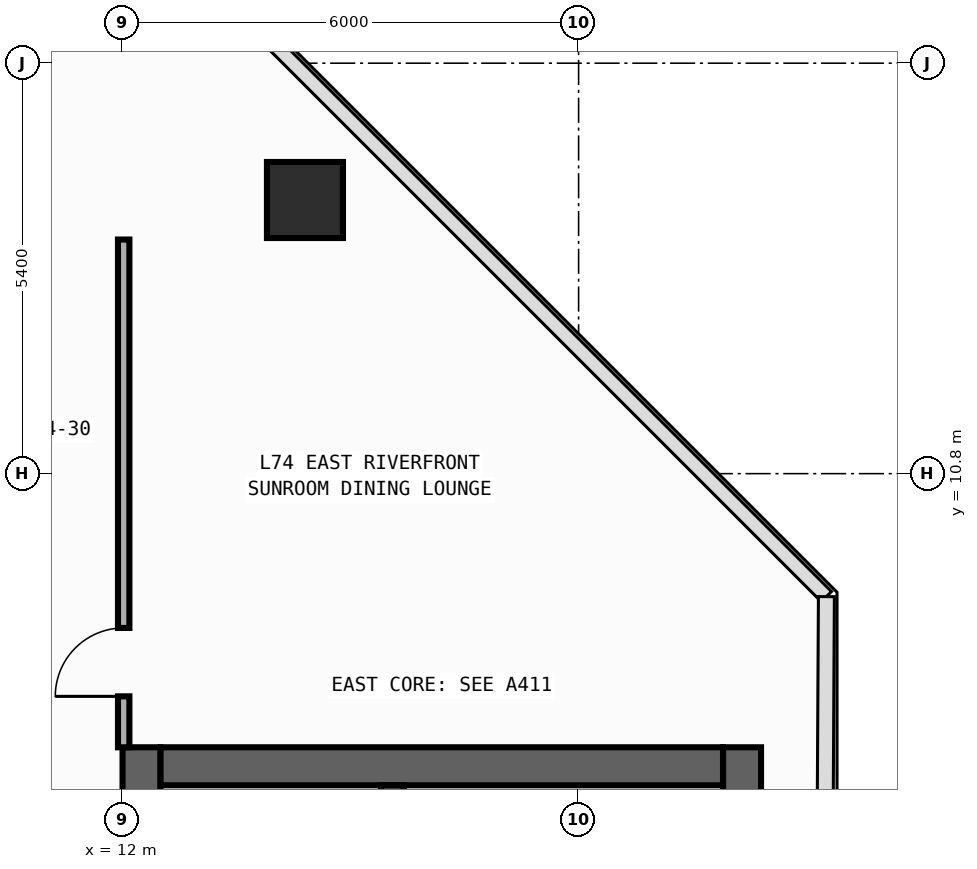
"""IFC4 building model, lengths in metres.
Left out: names, types, materials, properties, quantities, classifications, styles, units other than length and angle.
Written with IfcOpenShell. Run it as: python <this file> out.ifc"""

import sys

from ifc_helpers import new_model, si_unit, direction, frame, frame_2d, origin, origin_2d, place, context, subcontext, project, spatial, rectangle, circle, extrude, element, fill, save


model = new_model("IFC4")
c1 = context("Model", 3, precision=1e-05, world=origin(), true_north=direction((0.0, 1.0)))
c2 = subcontext(c1, "Body", "Model", "MODEL_VIEW")
j1 = project(units=[si_unit("LENGTHUNIT", "METRE"), si_unit("PLANEANGLEUNIT", "RADIAN")], contexts=[c1])
p1 = place(None, origin())
s1 = spatial("IfcSite", under=j1, at=p1, CompositionType="ELEMENT")
p2 = place(p1, origin())
s2 = spatial("IfcBuilding", under=s1, at=p2, CompositionType="ELEMENT")
p3 = place(p2, frame((0.0, 0.0, 308.0)))
s3 = spatial("IfcBuildingStorey", under=s2, at=p3, CompositionType="ELEMENT", Elevation=308.0)
p4 = place(p3, frame((12.25, -19.8, 0.0), z_axis=(0.0, 0.0, 1.0), x_axis=(0.0, 1.0, 0.0)))
e1 = element("IfcWall", 1, at=p4, inside=s3, PredefinedType="SHEAR", context=c2, shape_type="SweptSolid", body=[
    extrude(rectangle(XDim=27.0, YDim=0.5, at=frame_2d((13.5, 0.0))), origin(), (0.0, 0.0, 1.0), 3.54),
])
p5 = place(p4, frame((23.05, 0.0, 0.0)))
e2 = element("IfcOpeningElement", 2, at=p5, cuts=e1, PredefinedType="OPENING", context=c2, shape_type="SweptSolid", body=[
    extrude(rectangle(XDim=1.1, YDim=2.2, at=frame_2d((0.55, 1.1))), frame((0.0, 0.26, 0.0), z_axis=(0.0, -1.0, 0.0), x_axis=(1.0, 0.0, 0.0)), (0.0, 0.0, 1.0), 0.52),
])
p6 = place(p4, frame((19.85, 0.0, 0.0)))
e3 = element("IfcOpeningElement", 3, at=p6, cuts=e1, PredefinedType="OPENING", context=c2, shape_type="SweptSolid", body=[
    extrude(rectangle(XDim=1.1, YDim=2.2, at=frame_2d((0.55, 1.1))), frame((0.0, 0.26, 0.0), z_axis=(0.0, -1.0, 0.0), x_axis=(1.0, 0.0, 0.0)), (0.0, 0.0, 1.0), 0.52),
])
p7 = place(p4, frame((16.65, 0.0, 0.0)))
e4 = element("IfcOpeningElement", 4, at=p7, cuts=e1, PredefinedType="OPENING", context=c2, shape_type="SweptSolid", body=[
    extrude(rectangle(XDim=1.1, YDim=2.2, at=frame_2d((0.55, 1.1))), frame((0.0, 0.26, 0.0), z_axis=(0.0, -1.0, 0.0), x_axis=(1.0, 0.0, 0.0)), (0.0, 0.0, 1.0), 0.52),
])
p8 = place(p4, frame((6.275, 0.0, 0.0)))
e5 = element("IfcOpeningElement", 5, at=p8, cuts=e1, PredefinedType="OPENING", context=c2, shape_type="SweptSolid", body=[
    extrude(rectangle(XDim=0.85, YDim=2.1, at=frame_2d((0.425, 1.05))), frame((0.0, 0.26, 0.0), z_axis=(0.0, -1.0, 0.0), x_axis=(1.0, 0.0, 0.0)), (0.0, 0.0, 1.0), 0.52),
])
p9 = place(p4, frame((8.575, 0.0, 0.0)))
e6 = element("IfcOpeningElement", 6, at=p9, cuts=e1, PredefinedType="OPENING", context=c2, shape_type="SweptSolid", body=[
    extrude(rectangle(XDim=0.85, YDim=2.1, at=frame_2d((0.425, 1.05))), frame((0.0, 0.26, 0.0), z_axis=(0.0, -1.0, 0.0), x_axis=(1.0, 0.0, 0.0)), (0.0, 0.0, 1.0), 0.52),
])
p10 = place(p4, frame((10.675, 0.0, 0.0)))
e7 = element("IfcOpeningElement", 7, at=p10, cuts=e1, PredefinedType="OPENING", context=c2, shape_type="SweptSolid", body=[
    extrude(rectangle(XDim=0.85, YDim=2.1, at=frame_2d((0.425, 1.05))), frame((0.0, 0.26, 0.0), z_axis=(0.0, -1.0, 0.0), x_axis=(1.0, 0.0, 0.0)), (0.0, 0.0, 1.0), 0.52),
])
p11 = place(p4, frame((12.725, 0.0, 0.0)))
e8 = element("IfcOpeningElement", 8, at=p11, cuts=e1, PredefinedType="OPENING", context=c2, shape_type="SweptSolid", body=[
    extrude(rectangle(XDim=1.15, YDim=2.2, at=frame_2d((0.575, 1.1))), frame((0.0, 0.26, 0.0), z_axis=(0.0, -1.0, 0.0), x_axis=(1.0, 0.0, 0.0)), (0.0, 0.0, 1.0), 0.52),
])
p12 = place(p4, frame((25.125, 0.0, 0.0)))
e9 = element("IfcOpeningElement", 9, at=p12, cuts=e1, PredefinedType="OPENING", context=c2, shape_type="SweptSolid", body=[
    extrude(rectangle(XDim=0.85, YDim=2.1, at=frame_2d((0.425, 1.05))), frame((0.0, 0.26, 0.0), z_axis=(0.0, -1.0, 0.0), x_axis=(1.0, 0.0, 0.0)), (0.0, 0.0, 1.0), 0.52),
])
p13 = place(p3, frame((20.15, -19.8, 0.0), z_axis=(0.0, 0.0, 1.0), x_axis=(0.0, 1.0, 0.0)))
e10 = element("IfcWall", 10, at=p13, inside=s3, PredefinedType="SHEAR", context=c2, shape_type="SweptSolid", body=[
    extrude(rectangle(XDim=27.0, YDim=0.5, at=frame_2d((13.5, 0.0))), origin(), (0.0, 0.0, 1.0), 3.54),
])
p14 = place(p3, frame((12.5, 6.95, 0.0), z_axis=(0.0, 0.0, 1.0), x_axis=(1.0, 0.0, 0.0)))
e11 = element("IfcWall", 11, at=p14, inside=s3, PredefinedType="SHEAR", context=c2, shape_type="SweptSolid", body=[
    extrude(rectangle(XDim=7.4, YDim=0.5, at=frame_2d((3.7, 0.0))), origin(), (0.0, 0.0, 1.0), 3.54),
])
p15 = place(p3, frame((15.55, -19.3, 0.0), z_axis=(0.0, 0.0, 1.0), x_axis=(0.0, 1.0, 0.0)))
e12 = element("IfcWall", 12, at=p15, inside=s3, PredefinedType="SHEAR", context=c2, shape_type="SweptSolid", body=[
    extrude(rectangle(XDim=26.0, YDim=0.3, at=frame_2d((13.0, 0.0))), origin(), (0.0, 0.0, 1.0), 3.54),
])
p16 = place(p15, frame((12.225, 0.0, 0.0)))
e13 = element("IfcOpeningElement", 13, at=p16, cuts=e12, PredefinedType="OPENING", context=c2, shape_type="SweptSolid", body=[
    extrude(rectangle(XDim=1.15, YDim=2.2, at=frame_2d((0.575, 1.1))), frame((0.0, 0.16, 0.0), z_axis=(0.0, -1.0, 0.0), x_axis=(1.0, 0.0, 0.0)), (0.0, 0.0, 1.0), 0.32),
])
p17 = place(p15, frame((24.625, 0.0, 0.0)))
e14 = element("IfcOpeningElement", 14, at=p17, cuts=e12, PredefinedType="OPENING", context=c2, shape_type="SweptSolid", body=[
    extrude(rectangle(XDim=0.85, YDim=2.1, at=frame_2d((0.425, 1.05))), frame((0.0, 0.16, 0.0), z_axis=(0.0, -1.0, 0.0), x_axis=(1.0, 0.0, 0.0)), (0.0, 0.0, 1.0), 0.32),
])
p18 = place(p3, frame((14.4, 14.4, 0.0), z_axis=(0.0, 0.0, 1.0), x_axis=(1.0, 0.0, 0.0)))
e15 = element("IfcColumn", 15, at=p18, inside=s3, PredefinedType="COLUMN", context=c2, shape_type="SweptSolid", body=[
    extrude(circle(Radius=0.5, at=origin_2d()), origin(), (0.0, 0.0, 1.0), 3.8),
])
p19 = place(p3, frame((12.015, 7.2, 0.0), z_axis=(0.0, 0.0, 1.0), x_axis=(0.0, 1.0, 0.0)))
e16 = element("IfcWall", 16, at=p19, inside=s3, PredefinedType="PARTITIONING", context=c2, shape_type="SweptSolid", body=[
    extrude(rectangle(XDim=6.68, YDim=0.15, at=frame_2d((3.34, 0.0))), origin(), (0.0, 0.0, 1.0), 3.54),
])
p20 = place(p19, frame((0.67, 0.0, 0.0)))
e17 = element("IfcOpeningElement", 17, at=p20, cuts=e16, PredefinedType="OPENING", context=c2, shape_type="SweptSolid", body=[
    extrude(rectangle(XDim=0.9, YDim=2.15, at=frame_2d((0.45, 1.075))), frame((0.0, 0.085, 0.0), z_axis=(0.0, -1.0, 0.0), x_axis=(1.0, 0.0, 0.0)), (0.0, 0.0, 1.0), 0.17),
])
p21 = place(p20, origin())
e18 = element("IfcDoor", 18, at=p21, inside=s3, OperationType="SINGLE_SWING_LEFT", PredefinedType="DOOR", context=c2, shape_type="SweptSolid", body=[
    extrude(rectangle(XDim=0.9, YDim=2.15, at=frame_2d((0.45, 1.075))), frame((0.0, 0.025, 0.0), z_axis=(0.0, -1.0, 0.0), x_axis=(1.0, 0.0, 0.0)), (0.0, 0.0, 1.0), 0.05),
])
fill(e17, e18)
save(model, sys.argv[1])
